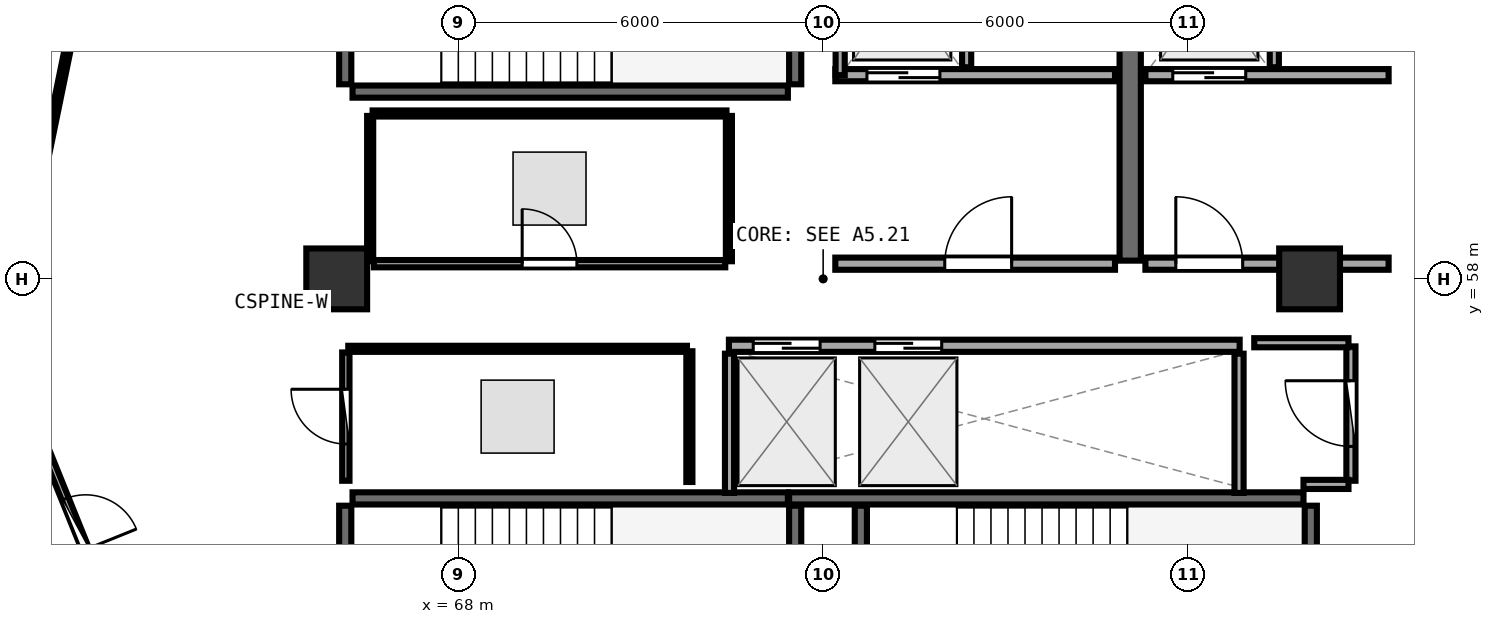
"""IFC4 building model, lengths in metres.
Left out: names, types, materials, properties, quantities, classifications, styles, units other than length and angle.
Written with IfcOpenShell. Run it as: python <this file> out.ifc"""

import sys

from ifc_helpers import new_model, si_unit, direction, frame, frame_2d, origin, origin_2d, place, context, subcontext, project, spatial, rectangle, extrude, element, fill, save


model = new_model("IFC4")
c1 = context("Model", 3, precision=1e-05, world=origin(), true_north=direction((0.0, 1.0)))
c2 = subcontext(c1, "Body", "Model", "MODEL_VIEW")
j1 = project(units=[si_unit("LENGTHUNIT", "METRE"), si_unit("PLANEANGLEUNIT", "RADIAN")], contexts=[c1])
p1 = place(None, origin())
s1 = spatial("IfcSite", under=j1, at=p1, CompositionType="ELEMENT")
p2 = place(p1, origin())
s2 = spatial("IfcBuilding", under=s1, at=p2, CompositionType="ELEMENT")
p3 = place(p2, frame((0.0, 0.0, 259.95)))
s3 = spatial("IfcBuildingStorey", under=s2, at=p3, CompositionType="ELEMENT", Elevation=259.95)
for number, where, z_axis, x_axis in (
    (1, (82.0, 58.0, 0.0), (0.0, 0.0, 1.0), (1.0, 0.0, 0.0)),
    (2, (66.0, 58.0, 0.0), (0.0, 0.0, 1.0), (1.0, 0.0, 0.0)),
):
    element("IfcColumn", number, at=place(p3, frame(where, z_axis=z_axis, x_axis=x_axis)), inside=s3, PredefinedType="PILASTER", context=c2, shape_type="SweptSolid", body=[
        extrude(rectangle(XDim=1.0, YDim=1.0, at=origin_2d()), origin(), (0.0, 0.0, 1.0), 3.75),
    ])
p4 = place(p3, frame((66.26, 61.08, 0.0), z_axis=(0.0, 0.0, 1.0), x_axis=(1.0, 0.0, 0.0)))
e3 = element("IfcWall", 3, at=p4, inside=s3, PredefinedType="SHEAR", context=c2, shape_type="SweptSolid", body=[
    extrude(rectangle(XDim=7.16, YDim=0.2, at=frame_2d((3.58, 0.0))), origin(), (0.0, 0.0, 1.0), 3.49),
])
p5 = place(p3, frame((73.54, 61.2, 0.0), z_axis=(0.0, 0.0, 1.0), x_axis=(0.0, 1.0, 0.0)))
e4 = element("IfcWall", 4, at=p5, inside=s3, PredefinedType="SHEAR", context=c2, shape_type="SweptSolid", body=[
    extrude(rectangle(XDim=3.07, YDim=0.2, at=frame_2d((1.535, 0.0))), origin(), (0.0, 0.0, 1.0), 3.49),
])
p6 = place(p3, frame((66.14, 64.27, 0.0), z_axis=(0.0, 0.0, 1.0), x_axis=(0.0, -1.0, 0.0)))
e5 = element("IfcWall", 5, at=p6, inside=s3, PredefinedType="SHEAR", context=c2, shape_type="SweptSolid", body=[
    extrude(rectangle(XDim=3.07, YDim=0.2, at=frame_2d((1.535, 0.0))), origin(), (0.0, 0.0, 1.0), 3.49),
])
p7 = place(p6, frame((1.01, 0.0, 0.0)))
e6 = element("IfcOpeningElement", 6, at=p7, cuts=e5, PredefinedType="OPENING", context=c2, shape_type="SweptSolid", body=[
    extrude(rectangle(XDim=1.05, YDim=2.1, at=frame_2d((0.525, 1.05))), frame((0.0, 0.11, 0.0), z_axis=(0.0, -1.0, 0.0), x_axis=(1.0, 0.0, 0.0)), (0.0, 0.0, 1.0), 0.22),
])
p8 = place(p3, frame((82.02, 51.2, 0.0), z_axis=(0.0, 0.0, 1.0), x_axis=(0.0, 1.0, 0.0)))
e7 = element("IfcWall", 7, at=p8, inside=s3, PredefinedType="SHEAR", context=c2, shape_type="SweptSolid", body=[
    extrude(rectangle(XDim=3.07, YDim=0.2, at=frame_2d((1.535, 0.0))), origin(), (0.0, 0.0, 1.0), 3.49),
])
p9 = place(p3, frame((81.9, 54.39, 0.0), z_axis=(0.0, 0.0, 1.0), x_axis=(-1.0, 0.0, 0.0)))
e8 = element("IfcWall", 8, at=p9, inside=s3, PredefinedType="SHEAR", context=c2, shape_type="SweptSolid", body=[
    extrude(rectangle(XDim=8.46, YDim=0.2, at=frame_2d((4.23, 0.0))), origin(), (0.0, 0.0, 1.0), 3.49),
])
for number, where, z_axis, x_axis in (
    (9, (74.62, 54.27, 0.0), (0.0, 0.0, 1.0), (0.0, -1.0, 0.0)),
    (10, (73.54, 51.2, 0.0), (0.0, 0.0, 1.0), (0.0, 1.0, 0.0)),
):
    element("IfcWall", number, at=place(p3, frame(where, z_axis=z_axis, x_axis=x_axis)), inside=s3, PredefinedType="SHEAR", context=c2, shape_type="SweptSolid", body=[
        extrude(rectangle(XDim=3.07, YDim=0.2, at=frame_2d((1.535, 0.0))), origin(), (0.0, 0.0, 1.0), 3.49),
    ])
p10 = place(p3, frame((73.42, 54.39, 0.0), z_axis=(0.0, 0.0, 1.0), x_axis=(-1.0, 0.0, 0.0)))
e11 = element("IfcWall", 11, at=p10, inside=s3, PredefinedType="SHEAR", context=c2, shape_type="SweptSolid", body=[
    extrude(rectangle(XDim=7.16, YDim=0.2, at=frame_2d((3.58, 0.0))), origin(), (0.0, 0.0, 1.0), 3.49),
])
p11 = place(p3, frame((66.14, 54.27, 0.0), z_axis=(0.0, 0.0, 1.0), x_axis=(0.0, -1.0, 0.0)))
e12 = element("IfcWall", 12, at=p11, inside=s3, PredefinedType="SHEAR", context=c2, shape_type="SweptSolid", body=[
    extrude(rectangle(XDim=3.07, YDim=0.2, at=frame_2d((1.535, 0.0))), origin(), (0.0, 0.0, 1.0), 3.49),
])
p12 = place(p11, frame((1.01, 0.0, 0.0)))
e13 = element("IfcOpeningElement", 13, at=p12, cuts=e12, PredefinedType="OPENING", context=c2, shape_type="SweptSolid", body=[
    extrude(rectangle(XDim=1.05, YDim=2.1, at=frame_2d((0.525, 1.05))), frame((0.0, 0.11, 0.0), z_axis=(0.0, -1.0, 0.0), x_axis=(1.0, 0.0, 0.0)), (0.0, 0.0, 1.0), 0.22),
])
p13 = place(p3, frame((79.05, 58.3, 0.0), z_axis=(0.0, 0.0, 1.0), x_axis=(0.0, 1.0, 0.0)))
e14 = element("IfcWall", 14, at=p13, inside=s3, PredefinedType="SHEAR", context=c2, shape_type="SweptSolid", body=[
    extrude(rectangle(XDim=6.3, YDim=0.35, at=frame_2d((3.15, 0.0))), origin(), (0.0, 0.0, 1.0), 3.49),
])
p14 = place(p3, frame((74.2, 61.35, 0.0), z_axis=(0.0, 0.0, 1.0), x_axis=(1.0, 0.0, 0.0)))
e15 = element("IfcWall", 15, at=p14, inside=s3, PredefinedType="SOLIDWALL", context=c2, shape_type="SweptSolid", body=[
    extrude(rectangle(XDim=4.6, YDim=0.2, at=frame_2d((2.3, 0.0))), origin(), (0.0, 0.0, 1.0), 3.48),
])
p15 = place(p14, frame((0.52, 0.0, 0.0)))
e16 = element("IfcOpeningElement", 16, at=p15, cuts=e15, PredefinedType="OPENING", context=c2, shape_type="SweptSolid", body=[
    extrude(rectangle(XDim=1.2, YDim=2.15, at=frame_2d((0.6, 1.075))), frame((0.0, 0.11, 0.0), z_axis=(0.0, -1.0, 0.0), x_axis=(1.0, 0.0, 0.0)), (0.0, 0.0, 1.0), 0.22),
])
p16 = place(p3, frame((74.28, 61.35, 0.0), z_axis=(0.0, 0.0, 1.0), x_axis=(0.0, 1.0, 0.0)))
e17 = element("IfcWall", 17, at=p16, inside=s3, PredefinedType="PARTITIONING", context=c2, shape_type="SweptSolid", body=[
    extrude(rectangle(XDim=2.97, YDim=0.15, at=frame_2d((1.485, 0.0))), origin(), (0.0, 0.0, 1.0), 3.48),
])
p17 = place(p3, frame((76.36, 61.48, 0.0), z_axis=(0.0, 0.0, 1.0), x_axis=(0.0, 1.0, 0.0)))
e18 = element("IfcWall", 18, at=p17, inside=s3, PredefinedType="PARTITIONING", context=c2, shape_type="SweptSolid", body=[
    extrude(rectangle(XDim=2.84, YDim=0.15, at=frame_2d((1.42, 0.0))), origin(), (0.0, 0.0, 1.0), 3.48),
])
p18 = place(p3, frame((79.3, 61.35, 0.0), z_axis=(0.0, 0.0, 1.0), x_axis=(1.0, 0.0, 0.0)))
e19 = element("IfcWall", 19, at=p18, inside=s3, PredefinedType="SOLIDWALL", context=c2, shape_type="SweptSolid", body=[
    extrude(rectangle(XDim=4.0, YDim=0.2, at=frame_2d((2.0, 0.0))), origin(), (0.0, 0.0, 1.0), 2.775),
])
p19 = place(p18, frame((0.45, 0.0, 0.0)))
e20 = element("IfcOpeningElement", 20, at=p19, cuts=e19, PredefinedType="OPENING", context=c2, shape_type="SweptSolid", body=[
    extrude(rectangle(XDim=1.2, YDim=2.15, at=frame_2d((0.6, 1.075))), frame((0.0, 0.11, 0.0), z_axis=(0.0, -1.0, 0.0), x_axis=(1.0, 0.0, 0.0)), (0.0, 0.0, 1.0), 0.22),
])
p20 = place(p3, frame((81.42, 61.48, 0.0), z_axis=(0.0, 0.0, 1.0), x_axis=(0.0, 1.0, 0.0)))
e21 = element("IfcWall", 21, at=p20, inside=s3, PredefinedType="PARTITIONING", context=c2, shape_type="SweptSolid", body=[
    extrude(rectangle(XDim=2.84, YDim=0.15, at=frame_2d((1.42, 0.0))), origin(), (0.0, 0.0, 1.0), 3.48),
])
p21 = place(p3, frame((74.2, 58.25, 0.0), z_axis=(0.0, 0.0, 1.0), x_axis=(1.0, 0.0, 0.0)))
e22 = element("IfcWall", 22, at=p21, inside=s3, PredefinedType="SOLIDWALL", context=c2, shape_type="SweptSolid", body=[
    extrude(rectangle(XDim=4.6, YDim=0.2, at=frame_2d((2.3, 0.0))), origin(), (0.0, 0.0, 1.0), 3.48),
])
p22 = place(p21, frame((1.8, 0.0, 0.0)))
e23 = element("IfcOpeningElement", 23, at=p22, cuts=e22, PredefinedType="OPENING", context=c2, shape_type="SweptSolid", body=[
    extrude(rectangle(XDim=1.1, YDim=2.1, at=frame_2d((0.55, 1.05))), frame((0.0, 0.11, 0.0), z_axis=(0.0, -1.0, 0.0), x_axis=(1.0, 0.0, 0.0)), (0.0, 0.0, 1.0), 0.22),
])
p23 = place(p3, frame((79.3, 58.25, 0.0), z_axis=(0.0, 0.0, 1.0), x_axis=(1.0, 0.0, 0.0)))
e24 = element("IfcWall", 24, at=p23, inside=s3, PredefinedType="SOLIDWALL", context=c2, shape_type="SweptSolid", body=[
    extrude(rectangle(XDim=4.0, YDim=0.2, at=frame_2d((2.0, 0.0))), origin(), (0.0, 0.0, 1.0), 2.775),
])
p24 = place(p23, frame((0.5, 0.0, 0.0)))
e25 = element("IfcOpeningElement", 25, at=p24, cuts=e24, PredefinedType="OPENING", context=c2, shape_type="SweptSolid", body=[
    extrude(rectangle(XDim=1.1, YDim=2.1, at=frame_2d((0.55, 1.05))), frame((0.0, 0.11, 0.0), z_axis=(0.0, -1.0, 0.0), x_axis=(1.0, 0.0, 0.0)), (0.0, 0.0, 1.0), 0.22),
])
p25 = place(p3, frame((72.45, 56.9, 0.0), z_axis=(0.0, 0.0, 1.0), x_axis=(1.0, 0.0, 0.0)))
e26 = element("IfcWall", 26, at=p25, inside=s3, PredefinedType="SOLIDWALL", context=c2, shape_type="SweptSolid", body=[
    extrude(rectangle(XDim=8.4, YDim=0.2, at=frame_2d((4.2, 0.0))), origin(), (0.0, 0.0, 1.0), 3.48),
])
p26 = place(p25, frame((0.4, 0.0, 0.0)))
e27 = element("IfcOpeningElement", 27, at=p26, cuts=e26, PredefinedType="OPENING", context=c2, shape_type="SweptSolid", body=[
    extrude(rectangle(XDim=1.1, YDim=2.1, at=frame_2d((0.55, 1.05))), frame((0.0, 0.11, 0.0), z_axis=(0.0, -1.0, 0.0), x_axis=(1.0, 0.0, 0.0)), (0.0, 0.0, 1.0), 0.22),
])
p27 = place(p25, frame((2.4, 0.0, 0.0)))
e28 = element("IfcOpeningElement", 28, at=p27, cuts=e26, PredefinedType="OPENING", context=c2, shape_type="SweptSolid", body=[
    extrude(rectangle(XDim=1.1, YDim=2.1, at=frame_2d((0.55, 1.05))), frame((0.0, 0.11, 0.0), z_axis=(0.0, -1.0, 0.0), x_axis=(1.0, 0.0, 0.0)), (0.0, 0.0, 1.0), 0.22),
])
for number, where, z_axis, x_axis in (
    (29, (72.46, 54.48, 0.0), (0.0, 0.0, 1.0), (0.0, 1.0, 0.0)),
    (30, (80.84, 54.48, 0.0), (0.0, 0.0, 1.0), (0.0, 1.0, 0.0)),
):
    element("IfcWall", number, at=place(p3, frame(where, z_axis=z_axis, x_axis=x_axis)), inside=s3, PredefinedType="PARTITIONING", context=c2, shape_type="SweptSolid", body=[
        extrude(rectangle(XDim=2.29, YDim=0.15, at=frame_2d((1.145, 0.0))), origin(), (0.0, 0.0, 1.0), 3.48),
    ])
p28 = place(p3, frame((82.68, 54.68, 0.0), z_axis=(0.0, 0.0, 1.0), x_axis=(0.0, 1.0, 0.0)))
e31 = element("IfcWall", 31, at=p28, inside=s3, PredefinedType="PARTITIONING", context=c2, shape_type="SweptSolid", body=[
    extrude(rectangle(XDim=2.21, YDim=0.15, at=frame_2d((1.105, 0.0))), origin(), (0.0, 0.0, 1.0), 3.48),
])
p29 = place(p28, frame((0.565, 0.0, 0.0)))
e32 = element("IfcOpeningElement", 32, at=p29, cuts=e31, PredefinedType="OPENING", context=c2, shape_type="SweptSolid", body=[
    extrude(rectangle(XDim=1.08, YDim=2.1, at=frame_2d((0.54, 1.05))), frame((0.0, 0.085, 0.0), z_axis=(0.0, -1.0, 0.0), x_axis=(1.0, 0.0, 0.0)), (0.0, 0.0, 1.0), 0.17),
])
p30 = place(p3, frame((66.61, 58.25, 0.0), z_axis=(0.0, 0.0, 1.0), x_axis=(1.0, 0.0, 0.0)))
e33 = element("IfcWall", 33, at=p30, inside=s3, PredefinedType="PARTITIONING", context=c2, shape_type="SweptSolid", body=[
    extrude(rectangle(XDim=5.78, YDim=0.12, at=frame_2d((2.89, 0.0))), origin(), (0.0, 0.0, 1.0), 3.48),
])
p31 = place(p30, frame((2.44, 0.0, 0.0)))
e34 = element("IfcOpeningElement", 34, at=p31, cuts=e33, PredefinedType="OPENING", context=c2, shape_type="SweptSolid", body=[
    extrude(rectangle(XDim=0.9, YDim=2.08, at=frame_2d((0.45, 1.04))), frame((0.0, 0.07, 0.0), z_axis=(0.0, -1.0, 0.0), x_axis=(1.0, 0.0, 0.0)), (0.0, 0.0, 1.0), 0.14),
])
p32 = place(p3, frame((66.15, 54.68, 0.0), z_axis=(0.0, 0.0, 1.0), x_axis=(0.0, 1.0, 0.0)))
e35 = element("IfcWall", 35, at=p32, inside=s3, PredefinedType="PARTITIONING", context=c2, shape_type="SweptSolid", body=[
    extrude(rectangle(XDim=2.11, YDim=0.12, at=frame_2d((1.055, 0.0))), origin(), (0.0, 0.0, 1.0), 2.775),
])
p33 = place(p32, frame((0.605, 0.0, 0.0)))
e36 = element("IfcOpeningElement", 36, at=p33, cuts=e35, PredefinedType="OPENING", context=c2, shape_type="SweptSolid", body=[
    extrude(rectangle(XDim=0.9, YDim=2.08, at=frame_2d((0.45, 1.04))), frame((0.0, 0.07, 0.0), z_axis=(0.0, -1.0, 0.0), x_axis=(1.0, 0.0, 0.0)), (0.0, 0.0, 1.0), 0.14),
])
p34 = place(p3, frame((61.219, 55.16, 0.0), z_axis=(0.0, 0.0, 1.0), x_axis=(0.374574284654, -0.927196907499, 0.0)))
e37 = element("IfcWall", 37, at=p34, inside=s3, PredefinedType="PARTITIONING", context=c2, shape_type="SweptSolid", body=[
    extrude(rectangle(XDim=2.576, YDim=0.12, at=frame_2d((1.288, 0.0))), origin(), (0.0, 0.0, 1.0), 3.48),
])
p35 = place(p34, frame((0.838, 0.0, 0.0)))
e38 = element("IfcOpeningElement", 38, at=p35, cuts=e37, PredefinedType="OPENING", context=c2, shape_type="SweptSolid", body=[
    extrude(rectangle(XDim=0.9, YDim=2.08, at=frame_2d((0.45, 1.04))), frame((0.0, 0.07, 0.0), z_axis=(0.0, -1.0, 0.0), x_axis=(1.0, 0.0, 0.0)), (0.0, 0.0, 1.0), 0.14),
])
p36 = place(p3, frame((81.9, 54.62, 0.0), z_axis=(0.0, 0.0, 1.0), x_axis=(1.0, 0.0, 0.0)))
e39 = element("IfcWall", 39, at=p36, inside=s3, PredefinedType="PARTITIONING", context=c2, shape_type="SweptSolid", body=[
    extrude(rectangle(XDim=0.74, YDim=0.15, at=frame_2d((0.37, 0.0))), origin(), (0.0, 0.0, 1.0), 2.775),
])
p37 = place(p3, frame((82.64, 56.95, 0.0), z_axis=(0.0, 0.0, 1.0), x_axis=(-1.0, 0.0, 0.0)))
e40 = element("IfcWall", 40, at=p37, inside=s3, PredefinedType="PARTITIONING", context=c2, shape_type="SweptSolid", body=[
    extrude(rectangle(XDim=1.55, YDim=0.15, at=frame_2d((0.775, 0.0))), origin(), (0.0, 0.0, 1.0), 2.775),
])
p38 = place(p3, frame((72.45, 58.29, 0.0), z_axis=(0.0, 0.0, 1.0), x_axis=(0.0, 1.0, 0.0)))
e41 = element("IfcWall", 41, at=p38, inside=s3, PredefinedType="PARTITIONING", context=c2, shape_type="SweptSolid", body=[
    extrude(rectangle(XDim=2.39, YDim=0.1, at=frame_2d((1.195, 0.0))), origin(), (0.0, 0.0, 1.0), 3.48),
])
p39 = place(p3, frame((72.41, 60.72, 0.0), z_axis=(0.0, 0.0, 1.0), x_axis=(-1.0, 0.0, 0.0)))
e42 = element("IfcWall", 42, at=p39, inside=s3, PredefinedType="PARTITIONING", context=c2, shape_type="SweptSolid", body=[
    extrude(rectangle(XDim=5.82, YDim=0.1, at=frame_2d((2.91, 0.0))), origin(), (0.0, 0.0, 1.0), 3.48),
])
p40 = place(p3, frame((66.55, 60.68, 0.0), z_axis=(0.0, 0.0, 1.0), x_axis=(0.0, -1.0, 0.0)))
e43 = element("IfcWall", 43, at=p40, inside=s3, PredefinedType="PARTITIONING", context=c2, shape_type="SweptSolid", body=[
    extrude(rectangle(XDim=2.39, YDim=0.1, at=frame_2d((1.195, 0.0))), origin(), (0.0, 0.0, 1.0), 3.48),
])
p41 = place(p3, frame((71.8, 54.66, 0.0), z_axis=(0.0, 0.0, 1.0), x_axis=(0.0, 1.0, 0.0)))
e44 = element("IfcWall", 44, at=p41, inside=s3, PredefinedType="PARTITIONING", context=c2, shape_type="SweptSolid", body=[
    extrude(rectangle(XDim=2.15, YDim=0.1, at=frame_2d((1.075, 0.0))), origin(), (0.0, 0.0, 1.0), 3.48),
])
p42 = place(p3, frame((71.76, 56.85, 0.0), z_axis=(0.0, 0.0, 1.0), x_axis=(-1.0, 0.0, 0.0)))
e45 = element("IfcWall", 45, at=p42, inside=s3, PredefinedType="PARTITIONING", context=c2, shape_type="SweptSolid", body=[
    extrude(rectangle(XDim=5.57, YDim=0.1, at=frame_2d((2.785, 0.0))), origin(), (0.0, 0.0, 1.0), 2.775),
])
p43 = place(p3, frame((61.635, 62.066, 0.0), z_axis=(0.0, 0.0, 1.0), x_axis=(-0.200853183429, -0.979621354762, 0.0)))
e46 = element("IfcWall", 46, at=p43, inside=s3, PredefinedType="PARTITIONING", context=c2, shape_type="SweptSolid", body=[
    extrude(rectangle(XDim=3.963, YDim=0.1, at=frame_2d((1.981, 0.0))), origin(), (0.0, 0.0, 1.0), 3.48),
])
p44 = place(p15, origin())
e47 = element("IfcDoor", 47, at=p44, inside=s3, OperationType="DOUBLE_DOOR_SLIDING", PredefinedType="DOOR", context=c2, shape_type="SweptSolid", body=[
    extrude(rectangle(XDim=1.2, YDim=2.15, at=frame_2d((0.6, 1.075))), frame((0.0, 0.025, 0.0), z_axis=(0.0, -1.0, 0.0), x_axis=(1.0, 0.0, 0.0)), (0.0, 0.0, 1.0), 0.05),
])
fill(e16, e47)
p45 = place(p19, origin())
e48 = element("IfcDoor", 48, at=p45, inside=s3, OperationType="DOUBLE_DOOR_SLIDING", PredefinedType="DOOR", context=c2, shape_type="SweptSolid", body=[
    extrude(rectangle(XDim=1.2, YDim=2.15, at=frame_2d((0.6, 1.075))), frame((0.0, 0.025, 0.0), z_axis=(0.0, -1.0, 0.0), x_axis=(1.0, 0.0, 0.0)), (0.0, 0.0, 1.0), 0.05),
])
fill(e20, e48)
p46 = place(p22, frame((1.1, 0.0, 0.0), z_axis=(0.0, 0.0, 1.0), x_axis=(-1.0, 0.0, 0.0)))
e49 = element("IfcDoor", 49, at=p46, inside=s3, OperationType="SINGLE_SWING_LEFT", PredefinedType="DOOR", context=c2, shape_type="SweptSolid", body=[
    extrude(rectangle(XDim=1.1, YDim=2.1, at=frame_2d((0.55, 1.05))), frame((0.0, 0.025, 0.0), z_axis=(0.0, -1.0, 0.0), x_axis=(1.0, 0.0, 0.0)), (0.0, 0.0, 1.0), 0.05),
])
fill(e23, e49)
p47 = place(p24, frame((1.1, 0.0, 0.0), z_axis=(0.0, 0.0, 1.0), x_axis=(-1.0, 0.0, 0.0)))
e50 = element("IfcDoor", 50, at=p47, inside=s3, OperationType="SINGLE_SWING_RIGHT", PredefinedType="DOOR", context=c2, shape_type="SweptSolid", body=[
    extrude(rectangle(XDim=1.1, YDim=2.1, at=frame_2d((0.55, 1.05))), frame((0.0, 0.025, 0.0), z_axis=(0.0, -1.0, 0.0), x_axis=(1.0, 0.0, 0.0)), (0.0, 0.0, 1.0), 0.05),
])
fill(e25, e50)
p48 = place(p26, origin())
e51 = element("IfcDoor", 51, at=p48, inside=s3, OperationType="DOUBLE_DOOR_SLIDING", PredefinedType="DOOR", context=c2, shape_type="SweptSolid", body=[
    extrude(rectangle(XDim=1.1, YDim=2.1, at=frame_2d((0.55, 1.05))), frame((0.0, 0.025, 0.0), z_axis=(0.0, -1.0, 0.0), x_axis=(1.0, 0.0, 0.0)), (0.0, 0.0, 1.0), 0.05),
])
fill(e27, e51)
p49 = place(p27, origin())
e52 = element("IfcDoor", 52, at=p49, inside=s3, OperationType="DOUBLE_DOOR_SLIDING", PredefinedType="DOOR", context=c2, shape_type="SweptSolid", body=[
    extrude(rectangle(XDim=1.1, YDim=2.1, at=frame_2d((0.55, 1.05))), frame((0.0, 0.025, 0.0), z_axis=(0.0, -1.0, 0.0), x_axis=(1.0, 0.0, 0.0)), (0.0, 0.0, 1.0), 0.05),
])
fill(e28, e52)
p50 = place(p29, origin())
e53 = element("IfcDoor", 53, at=p50, inside=s3, OperationType="SINGLE_SWING_RIGHT", PredefinedType="DOOR", context=c2, shape_type="SweptSolid", body=[
    extrude(rectangle(XDim=1.08, YDim=2.1, at=frame_2d((0.54, 1.05))), frame((0.0, 0.025, 0.0), z_axis=(0.0, -1.0, 0.0), x_axis=(1.0, 0.0, 0.0)), (0.0, 0.0, 1.0), 0.05),
])
fill(e32, e53)
p51 = place(p31, origin())
e54 = element("IfcDoor", 54, at=p51, inside=s3, OperationType="SINGLE_SWING_LEFT", PredefinedType="DOOR", context=c2, shape_type="SweptSolid", body=[
    extrude(rectangle(XDim=0.9, YDim=2.08, at=frame_2d((0.45, 1.04))), frame((0.0, 0.025, 0.0), z_axis=(0.0, -1.0, 0.0), x_axis=(1.0, 0.0, 0.0)), (0.0, 0.0, 1.0), 0.05),
])
fill(e34, e54)
p52 = place(p33, origin())
e55 = element("IfcDoor", 55, at=p52, inside=s3, OperationType="SINGLE_SWING_RIGHT", PredefinedType="DOOR", context=c2, shape_type="SweptSolid", body=[
    extrude(rectangle(XDim=0.9, YDim=2.08, at=frame_2d((0.45, 1.04))), frame((0.0, 0.025, 0.0), z_axis=(0.0, -1.0, 0.0), x_axis=(1.0, 0.0, 0.0)), (0.0, 0.0, 1.0), 0.05),
])
fill(e36, e55)
p53 = place(p35, origin())
e56 = element("IfcDoor", 56, at=p53, inside=s3, OperationType="SINGLE_SWING_RIGHT", PredefinedType="DOOR", context=c2, shape_type="SweptSolid", body=[
    extrude(rectangle(XDim=0.9, YDim=2.08, at=frame_2d((0.45, 1.04))), frame((0.0, 0.025, 0.0), z_axis=(0.0, -1.0, 0.0), x_axis=(1.0, 0.0, 0.0)), (0.0, 0.0, 1.0), 0.05),
])
fill(e38, e56)
save(model, sys.argv[1])
